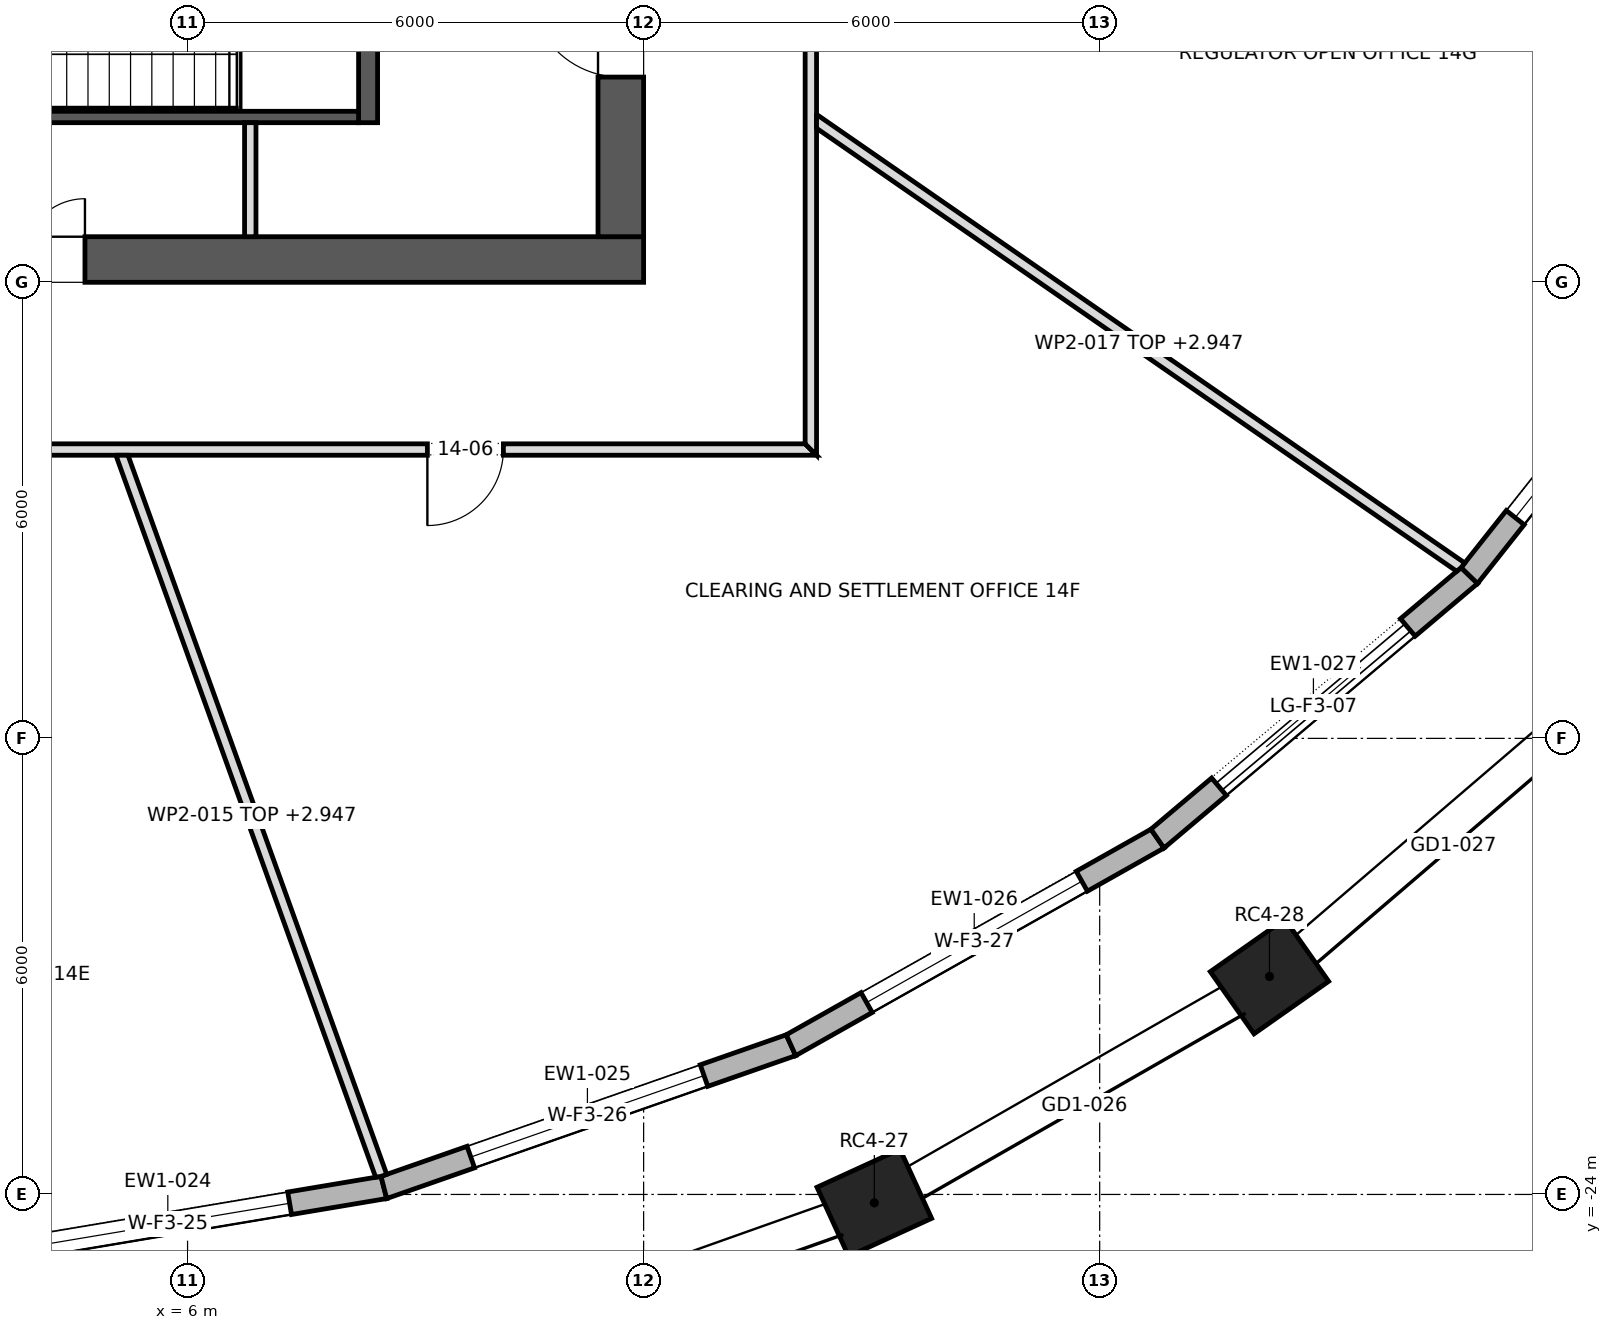
"""IFC4 building model, lengths in metres.
Left out: names, types, materials, properties, quantities, classifications, styles, units other than length and angle.
Written with IfcOpenShell. Run it as: python <this file> out.ifc"""

import sys

from ifc_helpers import new_model, si_unit, direction, frame, frame_2d, origin, origin_2d, place, context, subcontext, project, spatial, polyline, rectangle, outline, extrude, element, fill, save


model = new_model("IFC4")
c1 = context("Model", 3, precision=1e-05, world=origin(), true_north=direction((0.0, 1.0)))
c2 = subcontext(c1, "Body", "Model", "MODEL_VIEW")
j1 = project(units=[si_unit("LENGTHUNIT", "METRE"), si_unit("PLANEANGLEUNIT", "RADIAN")], contexts=[c1])
p1 = place(None, origin())
s1 = spatial("IfcSite", under=j1, at=p1, CompositionType="ELEMENT")
p2 = place(p1, origin())
s2 = spatial("IfcBuilding", under=s1, at=p2, CompositionType="ELEMENT")
p3 = place(p2, frame((0.0, 0.0, 210.9)))
s3 = spatial("IfcBuildingStorey", under=s2, at=p3, CompositionType="ELEMENT", Elevation=210.9)
for number, where, z_axis, x_axis in (
    (1, (15.035, -24.11, 0.0), (0.0, 0.0, 1.0), (0.909, 0.417, 0.0)),
    (2, (20.234, -21.133, 0.0), (0.0, 0.0, 1.0), (0.818, 0.575, 0.0)),
):
    element("IfcColumn", number, at=place(p3, frame(where, z_axis=z_axis, x_axis=x_axis)), inside=s3, PredefinedType="COLUMN", context=c2, shape_type="SweptSolid", body=[
        extrude(rectangle(XDim=1.2, YDim=1.0, at=origin_2d()), origin(), (0.0, 0.0, 1.0), 4.0),
    ])
p4 = place(p3, frame((-12.0, -11.7, 0.0), z_axis=(0.0, 0.0, 1.0), x_axis=(1.0, 0.0, 0.0)))
e3 = element("IfcWall", 3, at=p4, inside=s3, PredefinedType="SHEAR", context=c2, shape_type="SweptSolid", body=[
    extrude(rectangle(XDim=24.0, YDim=0.6, at=frame_2d((12.0, 0.0))), origin(), (0.0, 0.0, 1.0), 4.0),
])
p5 = place(p4, frame((9.975, 0.0, 0.0)))
e4 = element("IfcOpeningElement", 4, at=p5, cuts=e3, PredefinedType="OPENING", context=c2, shape_type="SweptSolid", body=[
    extrude(rectangle(XDim=0.9, YDim=2.1, at=frame_2d((0.45, 1.05))), frame((0.0, 0.312, 0.0), z_axis=(0.0, -1.0, 0.0), x_axis=(1.0, 0.0, 0.0)), (0.0, 0.0, 1.0), 0.624),
])
p6 = place(p4, frame((3.8, 0.0, 0.0)))
e5 = element("IfcOpeningElement", 5, at=p6, cuts=e3, PredefinedType="OPENING", context=c2, shape_type="SweptSolid", body=[
    extrude(rectangle(XDim=0.8, YDim=2.1, at=frame_2d((0.4, 1.05))), frame((0.0, 0.312, 0.0), z_axis=(0.0, -1.0, 0.0), x_axis=(1.0, 0.0, 0.0)), (0.0, 0.0, 1.0), 0.624),
])
p7 = place(p4, frame((5.8, 0.0, 0.0)))
e6 = element("IfcOpeningElement", 6, at=p7, cuts=e3, PredefinedType="OPENING", context=c2, shape_type="SweptSolid", body=[
    extrude(rectangle(XDim=0.8, YDim=2.1, at=frame_2d((0.4, 1.05))), frame((0.0, 0.312, 0.0), z_axis=(0.0, -1.0, 0.0), x_axis=(1.0, 0.0, 0.0)), (0.0, 0.0, 1.0), 0.624),
])
p8 = place(p4, frame((7.5, 0.0, 0.0)))
e7 = element("IfcOpeningElement", 7, at=p8, cuts=e3, PredefinedType="OPENING", context=c2, shape_type="SweptSolid", body=[
    extrude(rectangle(XDim=0.8, YDim=2.1, at=frame_2d((0.4, 1.05))), frame((0.0, 0.312, 0.0), z_axis=(0.0, -1.0, 0.0), x_axis=(1.0, 0.0, 0.0)), (0.0, 0.0, 1.0), 0.624),
])
p9 = place(p4, frame((15.85, 0.0, 0.0)))
e8 = element("IfcOpeningElement", 8, at=p9, cuts=e3, PredefinedType="OPENING", context=c2, shape_type="SweptSolid", body=[
    extrude(rectangle(XDim=0.8, YDim=2.1, at=frame_2d((0.4, 1.05))), frame((0.0, 0.312, 0.0), z_axis=(0.0, -1.0, 0.0), x_axis=(1.0, 0.0, 0.0)), (0.0, 0.0, 1.0), 0.624),
])
p10 = place(p3, frame((11.7, -11.4, 0.0), z_axis=(0.0, 0.0, 1.0), x_axis=(0.0, 1.0, 0.0)))
e9 = element("IfcWall", 9, at=p10, inside=s3, PredefinedType="SHEAR", context=c2, shape_type="SweptSolid", body=[
    extrude(rectangle(XDim=22.8, YDim=0.6, at=frame_2d((11.4, 0.0))), origin(), (0.0, 0.0, 1.0), 4.0),
])
p11 = place(p10, frame((10.2, 0.0, 0.0)))
e10 = element("IfcOpeningElement", 10, at=p11, cuts=e9, PredefinedType="OPENING", context=c2, shape_type="SweptSolid", body=[
    extrude(rectangle(XDim=2.4, YDim=2.1, at=frame_2d((1.2, 1.05))), frame((0.0, 0.312, 0.0), z_axis=(0.0, -1.0, 0.0), x_axis=(1.0, 0.0, 0.0)), (0.0, 0.0, 1.0), 0.624),
])
p12 = place(p10, frame((19.5, 0.0, 0.0)))
e11 = element("IfcOpeningElement", 11, at=p12, cuts=e9, PredefinedType="OPENING", context=c2, shape_type="SweptSolid", body=[
    extrude(rectangle(XDim=1.2, YDim=2.1, at=frame_2d((0.6, 1.05))), frame((0.0, 0.312, 0.0), z_axis=(0.0, -1.0, 0.0), x_axis=(1.0, 0.0, 0.0)), (0.0, 0.0, 1.0), 0.624),
])
p13 = place(p10, frame((2.1, 0.0, 0.0)))
e12 = element("IfcOpeningElement", 12, at=p13, cuts=e9, PredefinedType="OPENING", context=c2, shape_type="SweptSolid", body=[
    extrude(rectangle(XDim=1.2, YDim=2.1, at=frame_2d((0.6, 1.05))), frame((0.0, 0.312, 0.0), z_axis=(0.0, -1.0, 0.0), x_axis=(1.0, 0.0, 0.0)), (0.0, 0.0, 1.0), 0.624),
])
p14 = place(p3, frame((2.898, -24.862, 0.0), z_axis=(0.0, 0.0, 1.0), x_axis=(0.98622052717, 0.165436005116, 0.0)))
e13 = element("IfcWall", 13, at=p14, inside=s3, PredefinedType="STANDARD", context=c2, shape_type="SweptSolid", body=[
    extrude(outline(polyline([(-0.012, -0.15), (5.777, -0.15), (5.751, 0.15), (0.012, 0.15), (-0.012, -0.15)])), origin(), (0.0, 0.0, 1.0), 3.7),
])
p15 = place(p14, frame((1.257, 0.0, 0.6)))
e14 = element("IfcOpeningElement", 14, at=p15, cuts=e13, PredefinedType="OPENING", context=c2, shape_type="SweptSolid", body=[
    extrude(rectangle(XDim=3.25, YDim=2.65, at=frame_2d((1.625, 1.325))), frame((0.0, 0.162, 0.0), z_axis=(0.0, -1.0, 0.0), x_axis=(1.0, 0.0, 0.0)), (0.0, 0.0, 1.0), 0.324),
])
p16 = place(p3, frame((8.583, -23.908, 0.0), z_axis=(0.0, 0.0, 1.0), x_axis=(0.944023272224, 0.329878858824, 0.0)))
e15 = element("IfcWall", 15, at=p16, inside=s3, PredefinedType="STANDARD", context=c2, shape_type="SweptSolid", body=[
    extrude(outline(polyline([(-0.013, -0.15), (5.687, -0.15), (5.66, 0.15), (0.013, 0.15), (-0.013, -0.15)])), origin(), (0.0, 0.0, 1.0), 3.7),
])
p17 = place(p16, frame((1.212, 0.0, 0.6)))
e16 = element("IfcOpeningElement", 16, at=p17, cuts=e15, PredefinedType="OPENING", context=c2, shape_type="SweptSolid", body=[
    extrude(rectangle(XDim=3.25, YDim=2.65, at=frame_2d((1.625, 1.325))), frame((0.0, 0.162, 0.0), z_axis=(0.0, -1.0, 0.0), x_axis=(1.0, 0.0, 0.0)), (0.0, 0.0, 1.0), 0.324),
])
p18 = place(p3, frame((13.938, -22.037, 0.0), z_axis=(0.0, 0.0, 1.0), x_axis=(0.871140546168, 0.491033755278, 0.0)))
e17 = element("IfcWall", 17, at=p18, inside=s3, PredefinedType="STANDARD", context=c2, shape_type="SweptSolid", body=[
    extrude(outline(polyline([(-0.013, -0.15), (5.55, -0.15), (5.521, 0.15), (0.013, 0.15), (-0.013, -0.15)])), origin(), (0.0, 0.0, 1.0), 3.7),
])
p19 = place(p18, frame((1.143, 0.0, 0.6)))
e18 = element("IfcOpeningElement", 18, at=p19, cuts=e17, PredefinedType="OPENING", context=c2, shape_type="SweptSolid", body=[
    extrude(rectangle(XDim=3.25, YDim=2.65, at=frame_2d((1.625, 1.325))), frame((0.0, 0.162, 0.0), z_axis=(0.0, -1.0, 0.0), x_axis=(1.0, 0.0, 0.0)), (0.0, 0.0, 1.0), 0.324),
])
p20 = place(p3, frame((18.76, -19.319, 0.0), z_axis=(0.0, 0.0, 1.0), x_axis=(0.764386053229, 0.6447588399, 0.0)))
e19 = element("IfcWall", 19, at=p20, inside=s3, PredefinedType="STANDARD", context=c2, shape_type="SweptSolid", body=[
    extrude(outline(polyline([(-0.014, -0.15), (5.383, -0.15), (5.352, 0.15), (0.014, 0.15), (-0.014, -0.15)])), origin(), (0.0, 0.0, 1.0), 3.7),
])
p21 = place(p20, frame((1.059, 0.0, 0.0)))
e20 = element("IfcOpeningElement", 20, at=p21, cuts=e19, PredefinedType="OPENING", context=c2, shape_type="SweptSolid", body=[
    extrude(rectangle(XDim=3.25, YDim=3.25, at=frame_2d((1.625, 1.625))), frame((0.0, 0.162, 0.0), z_axis=(0.0, -1.0, 0.0), x_axis=(1.0, 0.0, 0.0)), (0.0, 0.0, 1.0), 0.324),
])
p22 = place(p3, frame((22.863, -15.858, 0.0), z_axis=(0.0, 0.0, 1.0), x_axis=(0.620870264345, 0.783913333763, 0.0)))
e21 = element("IfcWall", 21, at=p22, inside=s3, PredefinedType="STANDARD", context=c2, shape_type="SweptSolid", body=[
    extrude(outline(polyline([(-0.015, -0.15), (5.211, -0.15), (5.178, 0.15), (0.015, 0.15), (-0.015, -0.15)])), origin(), (0.0, 0.0, 1.0), 3.7),
])
p23 = place(p22, frame((0.972, 0.0, 0.6)))
e22 = element("IfcOpeningElement", 22, at=p23, cuts=e21, PredefinedType="OPENING", context=c2, shape_type="SweptSolid", body=[
    extrude(rectangle(XDim=3.25, YDim=2.65, at=frame_2d((1.625, 1.325))), frame((0.0, 0.162, 0.0), z_axis=(0.0, -1.0, 0.0), x_axis=(1.0, 0.0, 0.0)), (0.0, 0.0, 1.0), 0.324),
])
p24 = place(p3, frame((8.375, -9.9, 0.0), z_axis=(0.0, 0.0, 1.0), x_axis=(0.0, 1.0, 0.0)))
e23 = element("IfcWall", 23, at=p24, inside=s3, PredefinedType="SHEAR", context=c2, shape_type="SweptSolid", body=[
    extrude(rectangle(XDim=3.4, YDim=0.25, at=frame_2d((1.7, 0.0))), origin(), (0.0, 0.0, 1.0), 3.7),
])
p25 = place(p24, frame((1.175, 0.0, 0.0)))
e24 = element("IfcOpeningElement", 24, at=p25, cuts=e23, PredefinedType="OPENING", context=c2, shape_type="SweptSolid", body=[
    extrude(rectangle(XDim=1.2, YDim=2.1, at=frame_2d((0.6, 1.05))), frame((0.0, 0.137, 0.0), z_axis=(0.0, -1.0, 0.0), x_axis=(1.0, 0.0, 0.0)), (0.0, 0.0, 1.0), 0.274),
])
p26 = place(p3, frame((0.25, -9.825, 0.0), z_axis=(0.0, 0.0, 1.0), x_axis=(1.0, 0.0, 0.0)))
e25 = element("IfcWall", 25, at=p26, inside=s3, PredefinedType="SHEAR", context=c2, shape_type="SweptSolid", body=[
    extrude(rectangle(XDim=8.0, YDim=0.15, at=frame_2d((4.0, 0.0))), origin(), (0.0, 0.0, 1.0), 3.7),
])
p27 = place(p3, frame((6.825, -11.4, 0.0), z_axis=(0.0, 0.0, 1.0), x_axis=(0.0, 1.0, 0.0)))
e26 = element("IfcWall", 26, at=p27, inside=s3, PredefinedType="PARTITIONING", context=c2, shape_type="SweptSolid", body=[
    extrude(rectangle(XDim=1.5, YDim=0.15, at=frame_2d((0.75, 0.0))), origin(), (0.0, 0.0, 1.0), 3.7),
])
p28 = place(p3, frame((-14.275, -14.2, 0.0), z_axis=(0.0, 0.0, 1.0), x_axis=(1.0, 0.0, 0.0)))
e27 = element("IfcWall", 27, at=p28, inside=s3, PredefinedType="PARTITIONING", context=c2, shape_type="SweptSolid", body=[
    extrude(outline(polyline([(28.55, -0.075), (28.55, -0.075), (28.4, 0.075), (26.517, 0.075), (24.633, 0.075), (22.75, 0.075), (20.866, 0.075), (18.983, 0.075), (17.1, 0.075), (15.217, 0.075), (13.333, 0.075), (11.45, 0.075), (9.567, 0.075), (7.683, 0.075), (5.8, 0.075), (3.917, 0.075), (2.033, 0.075), (0.15, 0.075), (0.0, -0.075), (1.903, -0.075), (3.807, -0.075), (5.71, -0.075), (7.613, -0.075), (9.517, -0.075), (11.42, -0.075), (13.323, -0.075), (15.227, -0.075), (17.13, -0.075), (19.033, -0.075), (20.937, -0.075), (22.84, -0.075), (24.743, -0.075), (26.646, -0.075), (28.55, -0.075)])), origin(), (0.0, 0.0, 1.0), 3.7),
])
p29 = place(p28, frame((3.72, 0.0, 0.0)))
e28 = element("IfcOpeningElement", 28, at=p29, cuts=e27, PredefinedType="OPENING", context=c2, shape_type="SweptSolid", body=[
    extrude(rectangle(XDim=1.8, YDim=2.1, at=frame_2d((0.9, 1.05))), frame((0.0, 0.087, 0.0), z_axis=(0.0, -1.0, 0.0), x_axis=(1.0, 0.0, 0.0)), (0.0, 0.0, 1.0), 0.174),
])
p30 = place(p28, frame((13.775, 0.0, 0.0)))
e29 = element("IfcOpeningElement", 29, at=p30, cuts=e27, PredefinedType="OPENING", context=c2, shape_type="SweptSolid", body=[
    extrude(rectangle(XDim=1.0, YDim=2.1, at=frame_2d((0.5, 1.05))), frame((0.0, 0.087, 0.0), z_axis=(0.0, -1.0, 0.0), x_axis=(1.0, 0.0, 0.0)), (0.0, 0.0, 1.0), 0.174),
])
p31 = place(p28, frame((23.43, 0.0, 0.0)))
e30 = element("IfcOpeningElement", 30, at=p31, cuts=e27, PredefinedType="OPENING", context=c2, shape_type="SweptSolid", body=[
    extrude(rectangle(XDim=1.0, YDim=2.1, at=frame_2d((0.5, 1.05))), frame((0.0, 0.087, 0.0), z_axis=(0.0, -1.0, 0.0), x_axis=(1.0, 0.0, 0.0)), (0.0, 0.0, 1.0), 0.174),
])
p32 = place(p3, frame((5.128, -14.25, 0.0), z_axis=(0.0, 0.0, 1.0), x_axis=(0.338529589418, -0.940955746615, 0.0)))
e31 = element("IfcWall", 31, at=p32, inside=s3, PredefinedType="PARTITIONING", context=c2, shape_type="SweptSolid", body=[
    extrude(outline(polyline([(0.0, -0.075), (1.682, -0.075), (3.365, -0.075), (5.047, -0.075), (6.73, -0.075), (8.412, -0.075), (10.095, -0.075), (10.107, -0.005), (10.108, 0.072), (10.108, 0.075), (8.432, 0.075), (6.757, 0.075), (5.081, 0.075), (3.405, 0.075), (1.729, 0.075), (0.053, 0.075), (0.0, -0.074), (0.0, -0.075)])), origin(), (0.0, 0.0, 1.0), 2.947),
])
p33 = place(p3, frame((14.2, -14.275, 0.0), z_axis=(0.0, 0.0, 1.0), x_axis=(0.0, 1.0, 0.0)))
e32 = element("IfcWall", 32, at=p33, inside=s3, PredefinedType="PARTITIONING", context=c2, shape_type="SweptSolid", body=[
    extrude(outline(polyline([(0.0, -0.075), (1.859, -0.075), (3.718, -0.075), (5.577, -0.075), (7.436, -0.075), (9.295, -0.075), (11.155, -0.075), (13.013, -0.075), (13.177, 0.075), (11.315, 0.075), (9.455, 0.075), (7.594, 0.075), (5.733, 0.075), (3.872, 0.075), (2.011, 0.075), (0.15, 0.075), (0.0, -0.075)])), origin(), (0.0, 0.0, 1.0), 3.7),
])
p34 = place(p3, frame((14.232, -9.853, 0.0), z_axis=(0.0, 0.0, 1.0), x_axis=(0.822298116352, -0.569056946047, 0.0)))
e33 = element("IfcWall", 33, at=p34, inside=s3, PredefinedType="PARTITIONING", context=c2, shape_type="SweptSolid", body=[
    extrude(outline(polyline([(0.104, -0.075), (1.811, -0.075), (3.518, -0.075), (5.225, -0.075), (6.932, -0.075), (8.639, -0.075), (10.346, -0.075), (10.366, -0.002), (10.37, 0.07), (10.37, 0.075), (8.642, 0.075), (6.914, 0.075), (5.185, 0.075), (3.457, 0.075), (1.729, 0.075), (0.0, 0.075), (0.0, 0.075), (0.104, -0.075)])), origin(), (0.0, 0.0, 1.0), 2.947),
])
p35 = place(p15, origin())
e34 = element("IfcWindow", 34, at=p35, inside=s3, PartitioningType="TRIPLE_PANEL_VERTICAL", PredefinedType="WINDOW", context=c2, shape_type="SweptSolid", body=[
    extrude(rectangle(XDim=3.25, YDim=2.65, at=frame_2d((1.625, 1.325))), frame((0.0, 0.03, 0.0), z_axis=(0.0, -1.0, 0.0), x_axis=(1.0, 0.0, 0.0)), (0.0, 0.0, 1.0), 0.06),
])
fill(e14, e34)
p36 = place(p17, origin())
e35 = element("IfcWindow", 35, at=p36, inside=s3, PartitioningType="TRIPLE_PANEL_VERTICAL", PredefinedType="WINDOW", context=c2, shape_type="SweptSolid", body=[
    extrude(rectangle(XDim=3.25, YDim=2.65, at=frame_2d((1.625, 1.325))), frame((0.0, 0.03, 0.0), z_axis=(0.0, -1.0, 0.0), x_axis=(1.0, 0.0, 0.0)), (0.0, 0.0, 1.0), 0.06),
])
fill(e16, e35)
p37 = place(p19, origin())
e36 = element("IfcWindow", 36, at=p37, inside=s3, PartitioningType="TRIPLE_PANEL_VERTICAL", PredefinedType="WINDOW", context=c2, shape_type="SweptSolid", body=[
    extrude(rectangle(XDim=3.25, YDim=2.65, at=frame_2d((1.625, 1.325))), frame((0.0, 0.03, 0.0), z_axis=(0.0, -1.0, 0.0), x_axis=(1.0, 0.0, 0.0)), (0.0, 0.0, 1.0), 0.06),
])
fill(e18, e36)
p38 = place(p21, origin())
e37 = element("IfcDoor", 37, at=p38, inside=s3, OperationType="DOUBLE_DOOR_SLIDING", PredefinedType="DOOR", context=c2, shape_type="SweptSolid", body=[
    extrude(rectangle(XDim=3.25, YDim=3.25, at=frame_2d((1.625, 1.625))), frame((0.0, 0.025, 0.0), z_axis=(0.0, -1.0, 0.0), x_axis=(1.0, 0.0, 0.0)), (0.0, 0.0, 1.0), 0.05),
])
fill(e20, e37)
p39 = place(p23, origin())
e38 = element("IfcWindow", 38, at=p39, inside=s3, PartitioningType="TRIPLE_PANEL_VERTICAL", PredefinedType="WINDOW", context=c2, shape_type="SweptSolid", body=[
    extrude(rectangle(XDim=3.25, YDim=2.65, at=frame_2d((1.625, 1.325))), frame((0.0, 0.03, 0.0), z_axis=(0.0, -1.0, 0.0), x_axis=(1.0, 0.0, 0.0)), (0.0, 0.0, 1.0), 0.06),
])
fill(e22, e38)
p40 = place(p13, origin())
e39 = element("IfcDoor", 39, at=p40, inside=s3, OperationType="SINGLE_SWING_LEFT", PredefinedType="DOOR", context=c2, shape_type="SweptSolid", body=[
    extrude(rectangle(XDim=1.2, YDim=2.1, at=frame_2d((0.6, 1.05))), frame((0.0, 0.025, 0.0), z_axis=(0.0, -1.0, 0.0), x_axis=(1.0, 0.0, 0.0)), (0.0, 0.0, 1.0), 0.05),
])
fill(e12, e39)
p41 = place(p9, origin())
e40 = element("IfcDoor", 40, at=p41, inside=s3, OperationType="SINGLE_SWING_LEFT", PredefinedType="DOOR", context=c2, shape_type="SweptSolid", body=[
    extrude(rectangle(XDim=0.8, YDim=2.1, at=frame_2d((0.4, 1.05))), frame((0.0, 0.025, 0.0), z_axis=(0.0, -1.0, 0.0), x_axis=(1.0, 0.0, 0.0)), (0.0, 0.0, 1.0), 0.05),
])
fill(e8, e40)
p42 = place(p31, frame((1.0, 0.0, 0.0), z_axis=(0.0, 0.0, 1.0), x_axis=(-1.0, 0.0, 0.0)))
e41 = element("IfcDoor", 41, at=p42, inside=s3, OperationType="SINGLE_SWING_LEFT", PredefinedType="DOOR", context=c2, shape_type="SweptSolid", body=[
    extrude(rectangle(XDim=1.0, YDim=2.1, at=frame_2d((0.5, 1.05))), frame((0.0, 0.025, 0.0), z_axis=(0.0, -1.0, 0.0), x_axis=(1.0, 0.0, 0.0)), (0.0, 0.0, 1.0), 0.05),
])
fill(e30, e41)
save(model, sys.argv[1])
